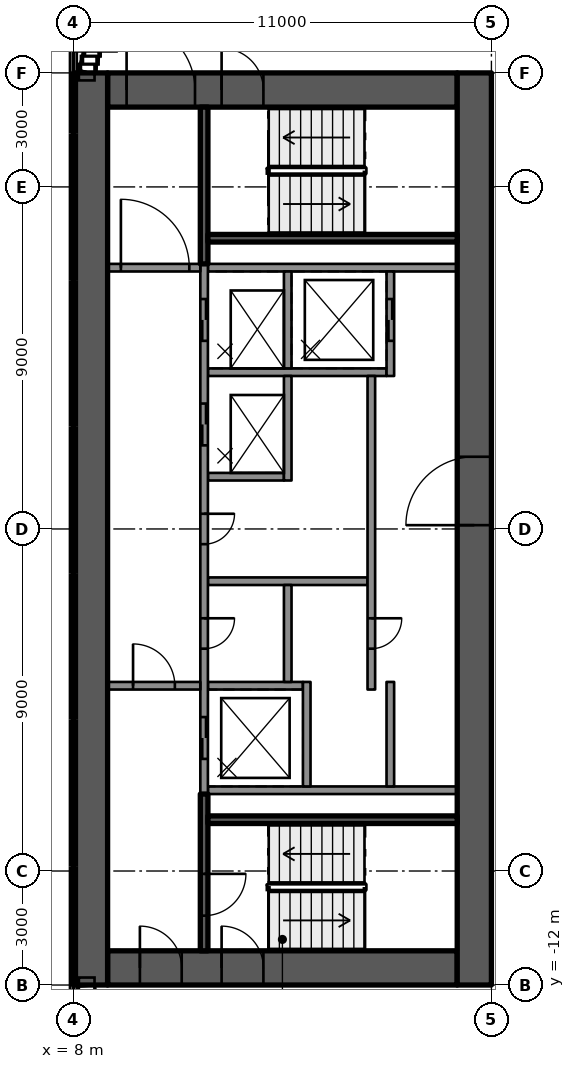
"""IFC4 building model, lengths in metres.
Left out: names, types, materials, properties, quantities, classifications, styles, units other than length and angle.
Written with IfcOpenShell. Run it as: python <this file> out.ifc"""

import sys

from ifc_helpers import new_model, si_unit, direction, frame, frame_2d, origin, place, context, subcontext, project, spatial, rectangle, extrude, element, fill, save


model = new_model("IFC4")
c1 = context("Model", 3, precision=1e-05, world=origin(), true_north=direction((0.0, 1.0)))
c2 = subcontext(c1, "Body", "Model", "MODEL_VIEW")
j1 = project(units=[si_unit("LENGTHUNIT", "METRE"), si_unit("PLANEANGLEUNIT", "RADIAN")], contexts=[c1])
p1 = place(None, origin())
s1 = spatial("IfcSite", under=j1, at=p1, CompositionType="ELEMENT")
p2 = place(p1, origin())
s2 = spatial("IfcBuilding", under=s1, at=p2, CompositionType="ELEMENT")
p3 = place(p2, frame((0.0, 0.0, 267.5)))
s3 = spatial("IfcBuildingStorey", under=s2, at=p3, CompositionType="ELEMENT", Elevation=267.5)
p4 = place(p3, frame((8.9, 11.55, 0.0), z_axis=(0.0, 0.0, 1.0), x_axis=(1.0, 0.0, 0.0)))
e1 = element("IfcWall", 1, at=p4, inside=s3, PredefinedType="SHEAR", context=c2, shape_type="SweptSolid", body=[
    extrude(rectangle(XDim=9.2, YDim=0.9, at=frame_2d((4.6, 0.0))), origin(), (0.0, 0.0, 1.0), 3.5),
])
p5 = place(p4, frame((0.5, 0.0, 0.0)))
e2 = element("IfcOpeningElement", 2, at=p5, cuts=e1, PredefinedType="OPENING", context=c2, shape_type="SweptSolid", body=[
    extrude(rectangle(XDim=1.8, YDim=2.1, at=frame_2d((0.9, 1.05))), frame((0.0, 0.46, 0.0), z_axis=(0.0, -1.0, 0.0), x_axis=(1.0, 0.0, 0.0)), (0.0, 0.0, 1.0), 0.92),
])
p6 = place(p4, frame((3.0, 0.0, 0.0)))
e3 = element("IfcOpeningElement", 3, at=p6, cuts=e1, PredefinedType="OPENING", context=c2, shape_type="SweptSolid", body=[
    extrude(rectangle(XDim=1.1, YDim=2.1, at=frame_2d((0.55, 1.05))), frame((0.0, 0.46, 0.0), z_axis=(0.0, -1.0, 0.0), x_axis=(1.0, 0.0, 0.0)), (0.0, 0.0, 1.0), 0.92),
])
p7 = place(p3, frame((8.9, -11.55, 0.0), z_axis=(0.0, 0.0, 1.0), x_axis=(1.0, 0.0, 0.0)))
e4 = element("IfcWall", 4, at=p7, inside=s3, PredefinedType="SHEAR", context=c2, shape_type="SweptSolid", body=[
    extrude(rectangle(XDim=9.2, YDim=0.9, at=frame_2d((4.6, 0.0))), origin(), (0.0, 0.0, 1.0), 3.5),
])
p8 = place(p7, frame((0.85, 0.0, 0.0)))
e5 = element("IfcOpeningElement", 5, at=p8, cuts=e4, PredefinedType="OPENING", context=c2, shape_type="SweptSolid", body=[
    extrude(rectangle(XDim=1.1, YDim=2.1, at=frame_2d((0.55, 1.05))), frame((0.0, 0.46, 0.0), z_axis=(0.0, -1.0, 0.0), x_axis=(1.0, 0.0, 0.0)), (0.0, 0.0, 1.0), 0.92),
])
p9 = place(p7, frame((3.0, 0.0, 0.0)))
e6 = element("IfcOpeningElement", 6, at=p9, cuts=e4, PredefinedType="OPENING", context=c2, shape_type="SweptSolid", body=[
    extrude(rectangle(XDim=1.1, YDim=2.1, at=frame_2d((0.55, 1.05))), frame((0.0, 0.46, 0.0), z_axis=(0.0, -1.0, 0.0), x_axis=(1.0, 0.0, 0.0)), (0.0, 0.0, 1.0), 0.92),
])
p10 = place(p3, frame((8.45, -12.0, 0.0), z_axis=(0.0, 0.0, 1.0), x_axis=(0.0, 1.0, 0.0)))
e7 = element("IfcWall", 7, at=p10, inside=s3, PredefinedType="SHEAR", context=c2, shape_type="SweptSolid", body=[
    extrude(rectangle(XDim=24.0, YDim=0.9, at=frame_2d((12.0, 0.0))), origin(), (0.0, 0.0, 1.0), 3.5),
])
p11 = place(p3, frame((18.55, -12.0, 0.0), z_axis=(0.0, 0.0, 1.0), x_axis=(0.0, 1.0, 0.0)))
e8 = element("IfcWall", 8, at=p11, inside=s3, PredefinedType="SHEAR", context=c2, shape_type="SweptSolid", body=[
    extrude(rectangle(XDim=24.0, YDim=0.9, at=frame_2d((12.0, 0.0))), origin(), (0.0, 0.0, 1.0), 3.5),
])
p12 = place(p11, frame((12.1, 0.0, 0.0)))
e9 = element("IfcOpeningElement", 9, at=p12, cuts=e8, PredefinedType="OPENING", context=c2, shape_type="SweptSolid", body=[
    extrude(rectangle(XDim=1.8, YDim=2.1, at=frame_2d((0.9, 1.05))), frame((0.0, 0.46, 0.0), z_axis=(0.0, -1.0, 0.0), x_axis=(1.0, 0.0, 0.0)), (0.0, 0.0, 1.0), 0.92),
])
for number, where, z_axis, x_axis in (
    (10, (11.54, -6.875, 0.0), (0.0, 0.0, 1.0), (1.0, 0.0, 0.0)),
    (11, (11.54, 6.875, 0.0), (0.0, 0.0, 1.0), (1.0, 0.0, 0.0)),
):
    element("IfcWall", number, at=place(p3, frame(where, z_axis=z_axis, x_axis=x_axis)), inside=s3, PredefinedType="SOLIDWALL", context=c2, shape_type="SweptSolid", body=[
        extrude(rectangle(XDim=6.56, YDim=0.2, at=frame_2d((3.28, 0.0))), origin(), (0.0, 0.0, 1.0), 3.05),
    ])
p13 = place(p3, frame((11.54, 4.125, 0.0), z_axis=(0.0, 0.0, 1.0), x_axis=(1.0, 0.0, 0.0)))
e12 = element("IfcWall", 12, at=p13, inside=s3, PredefinedType="SOLIDWALL", context=c2, shape_type="SweptSolid", body=[
    extrude(rectangle(XDim=4.7, YDim=0.2, at=frame_2d((2.35, 0.0))), origin(), (0.0, 0.0, 1.0), 3.05),
])
p14 = place(p3, frame((11.54, 1.375, 0.0), z_axis=(0.0, 0.0, 1.0), x_axis=(1.0, 0.0, 0.0)))
e13 = element("IfcWall", 13, at=p14, inside=s3, PredefinedType="SOLIDWALL", context=c2, shape_type="SweptSolid", body=[
    extrude(rectangle(XDim=2.0, YDim=0.2, at=frame_2d((1.0, 0.0))), origin(), (0.0, 0.0, 1.0), 3.05),
])
p15 = place(p3, frame((11.54, -1.375, 0.0), z_axis=(0.0, 0.0, 1.0), x_axis=(1.0, 0.0, 0.0)))
e14 = element("IfcWall", 14, at=p15, inside=s3, PredefinedType="SOLIDWALL", context=c2, shape_type="SweptSolid", body=[
    extrude(rectangle(XDim=4.2, YDim=0.2, at=frame_2d((2.1, 0.0))), origin(), (0.0, 0.0, 1.0), 3.05),
])
p16 = place(p3, frame((11.54, -4.125, 0.0), z_axis=(0.0, 0.0, 1.0), x_axis=(1.0, 0.0, 0.0)))
e15 = element("IfcWall", 15, at=p16, inside=s3, PredefinedType="SOLIDWALL", context=c2, shape_type="SweptSolid", body=[
    extrude(rectangle(XDim=2.5, YDim=0.2, at=frame_2d((1.25, 0.0))), origin(), (0.0, 0.0, 1.0), 3.05),
])
p17 = place(p3, frame((11.44, 6.975, 0.0), z_axis=(0.0, 0.0, 1.0), x_axis=(0.0, -1.0, 0.0)))
e16 = element("IfcWall", 16, at=p17, inside=s3, PredefinedType="SOLIDWALL", context=c2, shape_type="SweptSolid", body=[
    extrude(rectangle(XDim=13.95, YDim=0.2, at=frame_2d((6.975, 0.0))), origin(), (0.0, 0.0, 1.0), 3.05),
])
p18 = place(p17, frame((0.925, 0.0, 0.0)))
e17 = element("IfcOpeningElement", 17, at=p18, cuts=e16, PredefinedType="OPENING", context=c2, shape_type="SweptSolid", body=[
    extrude(rectangle(XDim=1.1, YDim=2.1, at=frame_2d((0.55, 1.05))), frame((0.0, 0.11, 0.0), z_axis=(0.0, -1.0, 0.0), x_axis=(1.0, 0.0, 0.0)), (0.0, 0.0, 1.0), 0.22),
])
p19 = place(p17, frame((3.675, 0.0, 0.0)))
e18 = element("IfcOpeningElement", 18, at=p19, cuts=e16, PredefinedType="OPENING", context=c2, shape_type="SweptSolid", body=[
    extrude(rectangle(XDim=1.1, YDim=2.1, at=frame_2d((0.55, 1.05))), frame((0.0, 0.11, 0.0), z_axis=(0.0, -1.0, 0.0), x_axis=(1.0, 0.0, 0.0)), (0.0, 0.0, 1.0), 0.22),
])
p20 = place(p17, frame((11.925, 0.0, 0.0)))
e19 = element("IfcOpeningElement", 19, at=p20, cuts=e16, PredefinedType="OPENING", context=c2, shape_type="SweptSolid", body=[
    extrude(rectangle(XDim=1.1, YDim=2.1, at=frame_2d((0.55, 1.05))), frame((0.0, 0.11, 0.0), z_axis=(0.0, -1.0, 0.0), x_axis=(1.0, 0.0, 0.0)), (0.0, 0.0, 1.0), 0.22),
])
p21 = place(p17, frame((6.575, 0.0, 0.0)))
e20 = element("IfcOpeningElement", 20, at=p21, cuts=e16, PredefinedType="OPENING", context=c2, shape_type="SweptSolid", body=[
    extrude(rectangle(XDim=0.8, YDim=2.1, at=frame_2d((0.4, 1.05))), frame((0.0, 0.11, 0.0), z_axis=(0.0, -1.0, 0.0), x_axis=(1.0, 0.0, 0.0)), (0.0, 0.0, 1.0), 0.22),
])
p22 = place(p17, frame((9.325, 0.0, 0.0)))
e21 = element("IfcOpeningElement", 21, at=p22, cuts=e16, PredefinedType="OPENING", context=c2, shape_type="SweptSolid", body=[
    extrude(rectangle(XDim=0.8, YDim=2.1, at=frame_2d((0.4, 1.05))), frame((0.0, 0.11, 0.0), z_axis=(0.0, -1.0, 0.0), x_axis=(1.0, 0.0, 0.0)), (0.0, 0.0, 1.0), 0.22),
])
p23 = place(p3, frame((13.64, 6.775, 0.0), z_axis=(0.0, 0.0, 1.0), x_axis=(0.0, -1.0, 0.0)))
e22 = element("IfcWall", 22, at=p23, inside=s3, PredefinedType="SOLIDWALL", context=c2, shape_type="SweptSolid", body=[
    extrude(rectangle(XDim=2.55, YDim=0.2, at=frame_2d((1.275, 0.0))), origin(), (0.0, 0.0, 1.0), 3.05),
])
p24 = place(p3, frame((13.64, 4.025, 0.0), z_axis=(0.0, 0.0, 1.0), x_axis=(0.0, -1.0, 0.0)))
e23 = element("IfcWall", 23, at=p24, inside=s3, PredefinedType="SOLIDWALL", context=c2, shape_type="SweptSolid", body=[
    extrude(rectangle(XDim=2.75, YDim=0.2, at=frame_2d((1.375, 0.0))), origin(), (0.0, 0.0, 1.0), 3.05),
])
p25 = place(p3, frame((13.64, -1.475, 0.0), z_axis=(0.0, 0.0, 1.0), x_axis=(0.0, -1.0, 0.0)))
e24 = element("IfcWall", 24, at=p25, inside=s3, PredefinedType="SOLIDWALL", context=c2, shape_type="SweptSolid", body=[
    extrude(rectangle(XDim=2.55, YDim=0.2, at=frame_2d((1.275, 0.0))), origin(), (0.0, 0.0, 1.0), 3.05),
])
p26 = place(p3, frame((14.14, -4.025, 0.0), z_axis=(0.0, 0.0, 1.0), x_axis=(0.0, -1.0, 0.0)))
e25 = element("IfcWall", 25, at=p26, inside=s3, PredefinedType="SOLIDWALL", context=c2, shape_type="SweptSolid", body=[
    extrude(rectangle(XDim=2.75, YDim=0.2, at=frame_2d((1.375, 0.0))), origin(), (0.0, 0.0, 1.0), 3.05),
])
p27 = place(p3, frame((16.34, 6.775, 0.0), z_axis=(0.0, 0.0, 1.0), x_axis=(0.0, -1.0, 0.0)))
e26 = element("IfcWall", 26, at=p27, inside=s3, PredefinedType="SOLIDWALL", context=c2, shape_type="SweptSolid", body=[
    extrude(rectangle(XDim=2.75, YDim=0.2, at=frame_2d((1.375, 0.0))), origin(), (0.0, 0.0, 1.0), 3.05),
])
p28 = place(p27, frame((0.725, 0.0, 0.0)))
e27 = element("IfcOpeningElement", 27, at=p28, cuts=e26, PredefinedType="OPENING", context=c2, shape_type="SweptSolid", body=[
    extrude(rectangle(XDim=1.1, YDim=2.1, at=frame_2d((0.55, 1.05))), frame((0.0, 0.11, 0.0), z_axis=(0.0, -1.0, 0.0), x_axis=(1.0, 0.0, 0.0)), (0.0, 0.0, 1.0), 0.22),
])
p29 = place(p3, frame((15.84, 4.025, 0.0), z_axis=(0.0, 0.0, 1.0), x_axis=(0.0, -1.0, 0.0)))
e28 = element("IfcWall", 28, at=p29, inside=s3, PredefinedType="SOLIDWALL", context=c2, shape_type="SweptSolid", body=[
    extrude(rectangle(XDim=8.25, YDim=0.2, at=frame_2d((4.125, 0.0))), origin(), (0.0, 0.0, 1.0), 3.05),
])
p30 = place(p29, frame((6.375, 0.0, 0.0)))
e29 = element("IfcOpeningElement", 29, at=p30, cuts=e28, PredefinedType="OPENING", context=c2, shape_type="SweptSolid", body=[
    extrude(rectangle(XDim=0.8, YDim=2.1, at=frame_2d((0.4, 1.05))), frame((0.0, 0.11, 0.0), z_axis=(0.0, -1.0, 0.0), x_axis=(1.0, 0.0, 0.0)), (0.0, 0.0, 1.0), 0.22),
])
p31 = place(p3, frame((16.34, -4.025, 0.0), z_axis=(0.0, 0.0, 1.0), x_axis=(0.0, -1.0, 0.0)))
e30 = element("IfcWall", 30, at=p31, inside=s3, PredefinedType="SOLIDWALL", context=c2, shape_type="SweptSolid", body=[
    extrude(rectangle(XDim=2.75, YDim=0.2, at=frame_2d((1.375, 0.0))), origin(), (0.0, 0.0, 1.0), 3.05),
])
p32 = place(p3, frame((11.44, -6.975, 0.0), z_axis=(0.0, 0.0, 1.0), x_axis=(0.0, -1.0, 0.0)))
e31 = element("IfcWall", 31, at=p32, inside=s3, PredefinedType="SOLIDWALL", context=c2, shape_type="SweptSolid", body=[
    extrude(rectangle(XDim=4.125, YDim=0.2, at=frame_2d((2.062, 0.0))), origin(), (0.0, 0.0, 1.0), 3.05),
])
p33 = place(p32, frame((2.1, 0.0, 0.0)))
e32 = element("IfcOpeningElement", 32, at=p33, cuts=e31, PredefinedType="OPENING", context=c2, shape_type="SweptSolid", body=[
    extrude(rectangle(XDim=1.1, YDim=2.1, at=frame_2d((0.55, 1.05))), frame((0.0, 0.11, 0.0), z_axis=(0.0, -1.0, 0.0), x_axis=(1.0, 0.0, 0.0)), (0.0, 0.0, 1.0), 0.22),
])
p34 = place(p3, frame((11.54, -7.65, 0.0), z_axis=(0.0, 0.0, 1.0), x_axis=(1.0, 0.0, 0.0)))
e33 = element("IfcWall", 33, at=p34, inside=s3, PredefinedType="SOLIDWALL", context=c2, shape_type="SweptSolid", body=[
    extrude(rectangle(XDim=6.56, YDim=0.2, at=frame_2d((3.28, 0.0))), origin(), (0.0, 0.0, 1.0), 3.05),
])
p35 = place(p3, frame((11.44, 11.1, 0.0), z_axis=(0.0, 0.0, 1.0), x_axis=(0.0, -1.0, 0.0)))
e34 = element("IfcWall", 34, at=p35, inside=s3, PredefinedType="SOLIDWALL", context=c2, shape_type="SweptSolid", body=[
    extrude(rectangle(XDim=4.125, YDim=0.2, at=frame_2d((2.062, 0.0))), origin(), (0.0, 0.0, 1.0), 3.05),
])
p36 = place(p3, frame((11.54, 7.65, 0.0), z_axis=(0.0, 0.0, 1.0), x_axis=(1.0, 0.0, 0.0)))
e35 = element("IfcWall", 35, at=p36, inside=s3, PredefinedType="SOLIDWALL", context=c2, shape_type="SweptSolid", body=[
    extrude(rectangle(XDim=6.56, YDim=0.2, at=frame_2d((3.28, 0.0))), origin(), (0.0, 0.0, 1.0), 3.05),
])
p37 = place(p3, frame((8.9, -4.125, 0.0), z_axis=(0.0, 0.0, 1.0), x_axis=(1.0, 0.0, 0.0)))
e36 = element("IfcWall", 36, at=p37, inside=s3, PredefinedType="PARTITIONING", context=c2, shape_type="SweptSolid", body=[
    extrude(rectangle(XDim=2.44, YDim=0.2, at=frame_2d((1.22, 0.0))), origin(), (0.0, 0.0, 1.0), 3.05),
])
p38 = place(p37, frame((0.67, 0.0, 0.0)))
e37 = element("IfcOpeningElement", 37, at=p38, cuts=e36, PredefinedType="OPENING", context=c2, shape_type="SweptSolid", body=[
    extrude(rectangle(XDim=1.1, YDim=2.1, at=frame_2d((0.55, 1.05))), frame((0.0, 0.11, 0.0), z_axis=(0.0, -1.0, 0.0), x_axis=(1.0, 0.0, 0.0)), (0.0, 0.0, 1.0), 0.22),
])
p39 = place(p3, frame((8.9, 6.875, 0.0), z_axis=(0.0, 0.0, 1.0), x_axis=(1.0, 0.0, 0.0)))
e38 = element("IfcWall", 38, at=p39, inside=s3, PredefinedType="PARTITIONING", context=c2, shape_type="SweptSolid", body=[
    extrude(rectangle(XDim=2.44, YDim=0.2, at=frame_2d((1.22, 0.0))), origin(), (0.0, 0.0, 1.0), 3.05),
])
p40 = place(p39, frame((0.35, 0.0, 0.0)))
e39 = element("IfcOpeningElement", 39, at=p40, cuts=e38, PredefinedType="OPENING", context=c2, shape_type="SweptSolid", body=[
    extrude(rectangle(XDim=1.8, YDim=2.1, at=frame_2d((0.9, 1.05))), frame((0.0, 0.11, 0.0), z_axis=(0.0, -1.0, 0.0), x_axis=(1.0, 0.0, 0.0)), (0.0, 0.0, 1.0), 0.22),
])
p41 = place(p18, origin())
e40 = element("IfcDoor", 40, at=p41, inside=s3, OperationType="DOUBLE_DOOR_SLIDING", PredefinedType="DOOR", context=c2, shape_type="SweptSolid", body=[
    extrude(rectangle(XDim=1.1, YDim=2.1, at=frame_2d((0.55, 1.05))), frame((0.0, 0.025, 0.0), z_axis=(0.0, -1.0, 0.0), x_axis=(1.0, 0.0, 0.0)), (0.0, 0.0, 1.0), 0.05),
])
fill(e17, e40)
p42 = place(p28, origin())
e41 = element("IfcDoor", 41, at=p42, inside=s3, OperationType="DOUBLE_DOOR_SLIDING", PredefinedType="DOOR", context=c2, shape_type="SweptSolid", body=[
    extrude(rectangle(XDim=1.1, YDim=2.1, at=frame_2d((0.55, 1.05))), frame((0.0, 0.025, 0.0), z_axis=(0.0, -1.0, 0.0), x_axis=(1.0, 0.0, 0.0)), (0.0, 0.0, 1.0), 0.05),
])
fill(e27, e41)
p43 = place(p19, origin())
e42 = element("IfcDoor", 42, at=p43, inside=s3, OperationType="DOUBLE_DOOR_SLIDING", PredefinedType="DOOR", context=c2, shape_type="SweptSolid", body=[
    extrude(rectangle(XDim=1.1, YDim=2.1, at=frame_2d((0.55, 1.05))), frame((0.0, 0.025, 0.0), z_axis=(0.0, -1.0, 0.0), x_axis=(1.0, 0.0, 0.0)), (0.0, 0.0, 1.0), 0.05),
])
fill(e18, e42)
p44 = place(p20, origin())
e43 = element("IfcDoor", 43, at=p44, inside=s3, OperationType="DOUBLE_DOOR_SLIDING", PredefinedType="DOOR", context=c2, shape_type="SweptSolid", body=[
    extrude(rectangle(XDim=1.1, YDim=2.1, at=frame_2d((0.55, 1.05))), frame((0.0, 0.025, 0.0), z_axis=(0.0, -1.0, 0.0), x_axis=(1.0, 0.0, 0.0)), (0.0, 0.0, 1.0), 0.05),
])
fill(e19, e43)
p45 = place(p21, origin())
e44 = element("IfcDoor", 44, at=p45, inside=s3, OperationType="SINGLE_SWING_RIGHT", PredefinedType="DOOR", context=c2, shape_type="SweptSolid", body=[
    extrude(rectangle(XDim=0.8, YDim=2.1, at=frame_2d((0.4, 1.05))), frame((0.0, 0.025, 0.0), z_axis=(0.0, -1.0, 0.0), x_axis=(1.0, 0.0, 0.0)), (0.0, 0.0, 1.0), 0.05),
])
fill(e20, e44)
p46 = place(p22, origin())
e45 = element("IfcDoor", 45, at=p46, inside=s3, OperationType="SINGLE_SWING_LEFT", PredefinedType="DOOR", context=c2, shape_type="SweptSolid", body=[
    extrude(rectangle(XDim=0.8, YDim=2.1, at=frame_2d((0.4, 1.05))), frame((0.0, 0.025, 0.0), z_axis=(0.0, -1.0, 0.0), x_axis=(1.0, 0.0, 0.0)), (0.0, 0.0, 1.0), 0.05),
])
fill(e21, e45)
p47 = place(p30, origin())
e46 = element("IfcDoor", 46, at=p47, inside=s3, OperationType="SINGLE_SWING_LEFT", PredefinedType="DOOR", context=c2, shape_type="SweptSolid", body=[
    extrude(rectangle(XDim=0.8, YDim=2.1, at=frame_2d((0.4, 1.05))), frame((0.0, 0.025, 0.0), z_axis=(0.0, -1.0, 0.0), x_axis=(1.0, 0.0, 0.0)), (0.0, 0.0, 1.0), 0.05),
])
fill(e29, e46)
p48 = place(p12, origin())
e47 = element("IfcDoor", 47, at=p48, inside=s3, OperationType="SINGLE_SWING_RIGHT", PredefinedType="DOOR", context=c2, shape_type="SweptSolid", body=[
    extrude(rectangle(XDim=1.8, YDim=2.1, at=frame_2d((0.9, 1.05))), frame((0.0, 0.025, 0.0), z_axis=(0.0, -1.0, 0.0), x_axis=(1.0, 0.0, 0.0)), (0.0, 0.0, 1.0), 0.05),
])
fill(e9, e47)
p49 = place(p8, origin())
e48 = element("IfcDoor", 48, at=p49, inside=s3, OperationType="SINGLE_SWING_LEFT", PredefinedType="DOOR", context=c2, shape_type="SweptSolid", body=[
    extrude(rectangle(XDim=1.1, YDim=2.1, at=frame_2d((0.55, 1.05))), frame((0.0, 0.025, 0.0), z_axis=(0.0, -1.0, 0.0), x_axis=(1.0, 0.0, 0.0)), (0.0, 0.0, 1.0), 0.05),
])
fill(e5, e48)
p50 = place(p38, origin())
e49 = element("IfcDoor", 49, at=p50, inside=s3, OperationType="SINGLE_SWING_RIGHT", PredefinedType="DOOR", context=c2, shape_type="SweptSolid", body=[
    extrude(rectangle(XDim=1.1, YDim=2.1, at=frame_2d((0.55, 1.05))), frame((0.0, 0.025, 0.0), z_axis=(0.0, -1.0, 0.0), x_axis=(1.0, 0.0, 0.0)), (0.0, 0.0, 1.0), 0.05),
])
fill(e37, e49)
p51 = place(p40, origin())
e50 = element("IfcDoor", 50, at=p51, inside=s3, OperationType="DOUBLE_DOOR_DOUBLE_SWING", PredefinedType="DOOR", context=c2, shape_type="SweptSolid", body=[
    extrude(rectangle(XDim=1.8, YDim=2.1, at=frame_2d((0.9, 1.05))), frame((0.0, 0.025, 0.0), z_axis=(0.0, -1.0, 0.0), x_axis=(1.0, 0.0, 0.0)), (0.0, 0.0, 1.0), 0.05),
])
fill(e39, e50)
p52 = place(p5, origin())
e51 = element("IfcDoor", 51, at=p52, inside=s3, OperationType="SINGLE_SWING_LEFT", PredefinedType="DOOR", context=c2, shape_type="SweptSolid", body=[
    extrude(rectangle(XDim=1.8, YDim=2.1, at=frame_2d((0.9, 1.05))), frame((0.0, 0.025, 0.0), z_axis=(0.0, -1.0, 0.0), x_axis=(1.0, 0.0, 0.0)), (0.0, 0.0, 1.0), 0.05),
])
fill(e2, e51)
p53 = place(p9, origin())
e52 = element("IfcDoor", 52, at=p53, inside=s3, OperationType="SINGLE_SWING_LEFT", PredefinedType="DOOR", context=c2, shape_type="SweptSolid", body=[
    extrude(rectangle(XDim=1.1, YDim=2.1, at=frame_2d((0.55, 1.05))), frame((0.0, 0.025, 0.0), z_axis=(0.0, -1.0, 0.0), x_axis=(1.0, 0.0, 0.0)), (0.0, 0.0, 1.0), 0.05),
])
fill(e6, e52)
p54 = place(p6, origin())
e53 = element("IfcDoor", 53, at=p54, inside=s3, OperationType="SINGLE_SWING_LEFT", PredefinedType="DOOR", context=c2, shape_type="SweptSolid", body=[
    extrude(rectangle(XDim=1.1, YDim=2.1, at=frame_2d((0.55, 1.05))), frame((0.0, 0.025, 0.0), z_axis=(0.0, -1.0, 0.0), x_axis=(1.0, 0.0, 0.0)), (0.0, 0.0, 1.0), 0.05),
])
fill(e3, e53)
p55 = place(p33, origin())
e54 = element("IfcDoor", 54, at=p55, inside=s3, OperationType="SINGLE_SWING_RIGHT", PredefinedType="DOOR", context=c2, shape_type="SweptSolid", body=[
    extrude(rectangle(XDim=1.1, YDim=2.1, at=frame_2d((0.55, 1.05))), frame((0.0, 0.025, 0.0), z_axis=(0.0, -1.0, 0.0), x_axis=(1.0, 0.0, 0.0)), (0.0, 0.0, 1.0), 0.05),
])
fill(e32, e54)
save(model, sys.argv[1])
